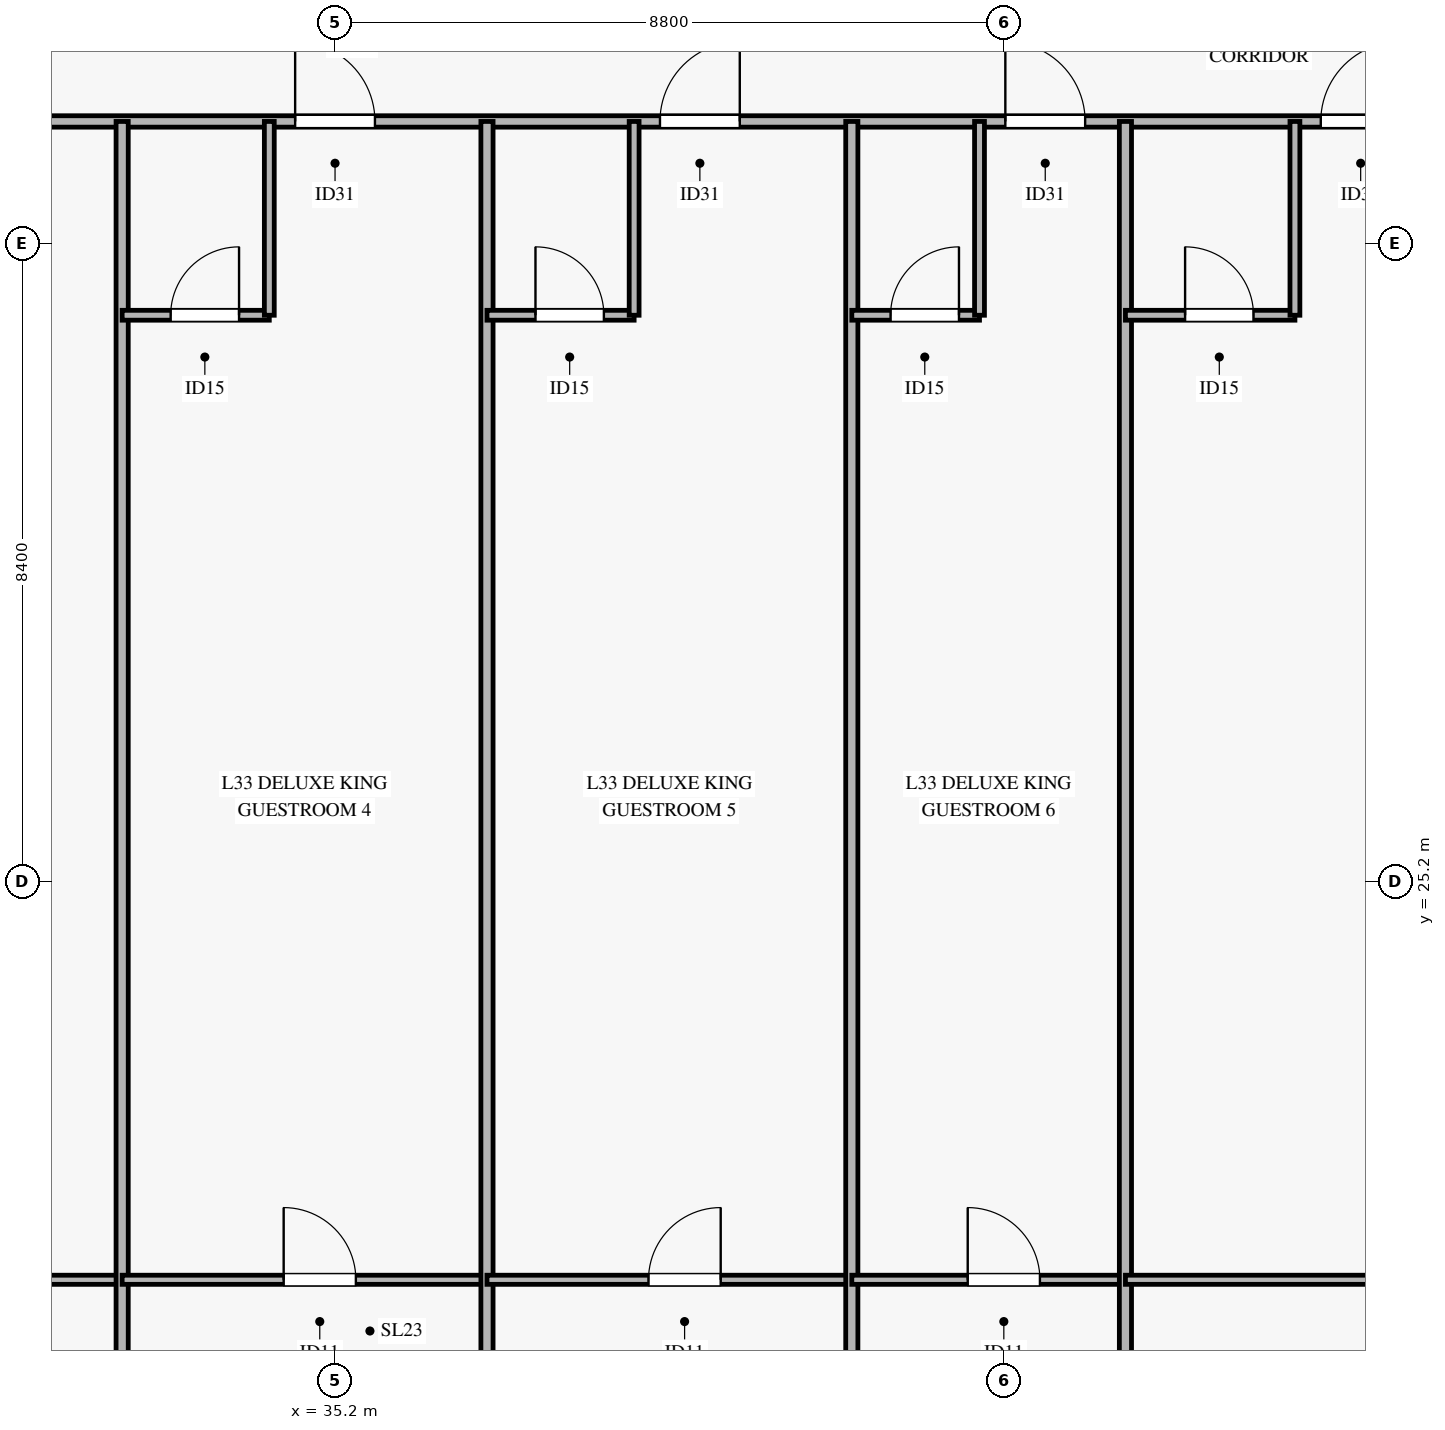
"""IFC4 building model, lengths in metres.
Left out: names, types, materials, properties, quantities, classifications, styles, units other than length and angle.
Written with IfcOpenShell. Run it as: python <this file> out.ifc"""

import sys

from ifc_helpers import new_model, si_unit, direction, frame, frame_2d, origin, place, context, subcontext, project, spatial, rectangle, extrude, source, transform, mapped, element, fill, save


model = new_model("IFC4")
c1 = context("Model", 3, precision=1e-05, world=origin(), true_north=direction((0.0, 1.0)))
c2 = subcontext(c1, "Body", "Model", "MODEL_VIEW")
j1 = project(units=[si_unit("LENGTHUNIT", "METRE"), si_unit("PLANEANGLEUNIT", "RADIAN")], contexts=[c1])
p1 = place(None, origin())
s1 = spatial("IfcSite", under=j1, at=p1, CompositionType="ELEMENT")
p2 = place(p1, origin())
s2 = spatial("IfcBuilding", under=s1, at=p2, CompositionType="ELEMENT")
p3 = place(p2, frame((0.0, 0.0, 137.7)))
s3 = spatial("IfcBuildingStorey", under=s2, at=p3, CompositionType="ELEMENT", Elevation=137.7)
p4 = place(p3, frame((5.214, 35.2, 0.0), z_axis=(0.0, 0.0, 1.0), x_axis=(1.0, 0.0, 0.0)))
e1 = element("IfcWall", 1, at=p4, inside=s3, PredefinedType="PARTITIONING", context=c2, shape_type="SweptSolid", body=[
    extrude(rectangle(XDim=59.972, YDim=0.15, at=frame_2d((29.986, 0.0))), origin(), (0.0, 0.0, 1.0), 2.455),
])
p5 = place(p4, frame((2.77, 0.0, 0.0)))
e2 = element("IfcOpeningElement", 2, at=p5, cuts=e1, PredefinedType="OPENING", context=c2, shape_type="SweptSolid", body=[
    extrude(rectangle(XDim=1.05, YDim=2.15, at=frame_2d((0.525, 1.075))), frame((0.0, 0.085, 0.0), z_axis=(0.0, -1.0, 0.0), x_axis=(1.0, 0.0, 0.0)), (0.0, 0.0, 1.0), 0.17),
])
p6 = place(p4, frame((19.156, 0.0, 0.0)))
e3 = element("IfcOpeningElement", 3, at=p6, cuts=e1, PredefinedType="OPENING", context=c2, shape_type="SweptSolid", body=[
    extrude(rectangle(XDim=1.05, YDim=2.15, at=frame_2d((0.525, 1.075))), frame((0.0, 0.085, 0.0), z_axis=(0.0, -1.0, 0.0), x_axis=(1.0, 0.0, 0.0)), (0.0, 0.0, 1.0), 0.17),
])
p7 = place(p4, frame((24.662, 0.0, 0.0)))
e4 = element("IfcOpeningElement", 4, at=p7, cuts=e1, PredefinedType="OPENING", context=c2, shape_type="SweptSolid", body=[
    extrude(rectangle(XDim=1.05, YDim=2.15, at=frame_2d((0.525, 1.075))), frame((0.0, 0.085, 0.0), z_axis=(0.0, -1.0, 0.0), x_axis=(1.0, 0.0, 0.0)), (0.0, 0.0, 1.0), 0.17),
])
p8 = place(p4, frame((29.462, 0.0, 0.0)))
e5 = element("IfcOpeningElement", 5, at=p8, cuts=e1, PredefinedType="OPENING", context=c2, shape_type="SweptSolid", body=[
    extrude(rectangle(XDim=1.05, YDim=2.15, at=frame_2d((0.525, 1.075))), frame((0.0, 0.085, 0.0), z_axis=(0.0, -1.0, 0.0), x_axis=(1.0, 0.0, 0.0)), (0.0, 0.0, 1.0), 0.17),
])
p9 = place(p4, frame((34.262, 0.0, 0.0)))
e6 = element("IfcOpeningElement", 6, at=p9, cuts=e1, PredefinedType="OPENING", context=c2, shape_type="SweptSolid", body=[
    extrude(rectangle(XDim=1.05, YDim=2.15, at=frame_2d((0.525, 1.075))), frame((0.0, 0.085, 0.0), z_axis=(0.0, -1.0, 0.0), x_axis=(1.0, 0.0, 0.0)), (0.0, 0.0, 1.0), 0.17),
])
p10 = place(p4, frame((38.806, 0.0, 0.0)))
e7 = element("IfcOpeningElement", 7, at=p10, cuts=e1, PredefinedType="OPENING", context=c2, shape_type="SweptSolid", body=[
    extrude(rectangle(XDim=1.05, YDim=2.15, at=frame_2d((0.525, 1.075))), frame((0.0, 0.085, 0.0), z_axis=(0.0, -1.0, 0.0), x_axis=(1.0, 0.0, 0.0)), (0.0, 0.0, 1.0), 0.17),
])
p11 = place(p4, frame((42.956, 0.0, 0.0)))
e8 = element("IfcOpeningElement", 8, at=p11, cuts=e1, PredefinedType="OPENING", context=c2, shape_type="SweptSolid", body=[
    extrude(rectangle(XDim=1.05, YDim=2.15, at=frame_2d((0.525, 1.075))), frame((0.0, 0.085, 0.0), z_axis=(0.0, -1.0, 0.0), x_axis=(1.0, 0.0, 0.0)), (0.0, 0.0, 1.0), 0.17),
])
p12 = place(p3, frame((27.6, 19.959, 0.0), z_axis=(0.0, 0.0, 1.0), x_axis=(1.0, 0.0, 0.0)))
e9 = element("IfcWall", 9, at=p12, inside=s3, PredefinedType="PARTITIONING", context=c2, shape_type="SweptSolid", body=[
    extrude(rectangle(XDim=4.8, YDim=0.12, at=frame_2d((2.4, 0.0))), origin(), (0.0, 0.0, 1.0), 2.455),
])
p13 = place(p12, frame((2.125, 0.0, 0.0)))
e10 = element("IfcOpeningElement", 10, at=p13, cuts=e9, PredefinedType="OPENING", context=c2, shape_type="SweptSolid", body=[
    extrude(rectangle(XDim=0.95, YDim=2.1, at=frame_2d((0.475, 1.05))), frame((0.0, 0.07, 0.0), z_axis=(0.0, -1.0, 0.0), x_axis=(1.0, 0.0, 0.0)), (0.0, 0.0, 1.0), 0.14),
])
p14 = place(p3, frame((32.4, 8.045, 0.0), z_axis=(0.0, 0.0, 1.0), x_axis=(0.0, 1.0, 0.0)))
e11 = element("IfcWall", 11, at=p14, inside=s3, PredefinedType="PARTITIONING", context=c2, shape_type="SweptSolid", body=[
    extrude(rectangle(XDim=27.155, YDim=0.16, at=frame_2d((13.578, 0.0))), origin(), (0.0, 0.0, 1.0), 2.755),
])
p15 = place(p3, frame((32.4, 32.65, 0.0), z_axis=(0.0, 0.0, 1.0), x_axis=(1.0, 0.0, 0.0)))
e12 = element("IfcWall", 12, at=p15, inside=s3, PredefinedType="PARTITIONING", context=c2, shape_type="SweptSolid", body=[
    extrude(rectangle(XDim=1.936, YDim=0.13, at=frame_2d((0.968, 0.0))), origin(), (0.0, 0.0, 1.0), 2.805),
])
p16 = place(p15, frame((0.638, 0.0, 0.0)))
e13 = element("IfcOpeningElement", 13, at=p16, cuts=e12, PredefinedType="OPENING", context=c2, shape_type="SweptSolid", body=[
    extrude(rectangle(XDim=0.9, YDim=2.1, at=frame_2d((0.45, 1.05))), frame((0.0, 0.075, 0.0), z_axis=(0.0, -1.0, 0.0), x_axis=(1.0, 0.0, 0.0)), (0.0, 0.0, 1.0), 0.15),
])
p17 = place(p3, frame((34.336, 32.65, 0.0), z_axis=(0.0, 0.0, 1.0), x_axis=(0.0, 1.0, 0.0)))
e14 = element("IfcWall", 14, at=p17, inside=s3, PredefinedType="PARTITIONING", context=c2, shape_type="SweptSolid", body=[
    extrude(rectangle(XDim=2.55, YDim=0.13, at=frame_2d((1.275, 0.0))), origin(), (0.0, 0.0, 1.0), 3.27),
])
p18 = place(p3, frame((32.4, 19.959, 0.0), z_axis=(0.0, 0.0, 1.0), x_axis=(1.0, 0.0, 0.0)))
e15 = element("IfcWall", 15, at=p18, inside=s3, PredefinedType="PARTITIONING", context=c2, shape_type="SweptSolid", body=[
    extrude(rectangle(XDim=4.8, YDim=0.12, at=frame_2d((2.4, 0.0))), origin(), (0.0, 0.0, 1.0), 3.27),
])
p19 = place(p18, frame((2.125, 0.0, 0.0)))
e16 = element("IfcOpeningElement", 16, at=p19, cuts=e15, PredefinedType="OPENING", context=c2, shape_type="SweptSolid", body=[
    extrude(rectangle(XDim=0.95, YDim=2.1, at=frame_2d((0.475, 1.05))), frame((0.0, 0.07, 0.0), z_axis=(0.0, -1.0, 0.0), x_axis=(1.0, 0.0, 0.0)), (0.0, 0.0, 1.0), 0.14),
])
p20 = place(p3, frame((37.2, 8.045, 0.0), z_axis=(0.0, 0.0, 1.0), x_axis=(0.0, 1.0, 0.0)))
e17 = element("IfcWall", 17, at=p20, inside=s3, PredefinedType="PARTITIONING", context=c2, shape_type="SweptSolid", body=[
    extrude(rectangle(XDim=27.155, YDim=0.16, at=frame_2d((13.578, 0.0))), origin(), (0.0, 0.0, 1.0), 2.805),
])
p21 = place(p3, frame((37.2, 32.65, 0.0), z_axis=(0.0, 0.0, 1.0), x_axis=(1.0, 0.0, 0.0)))
e18 = element("IfcWall", 18, at=p21, inside=s3, PredefinedType="PARTITIONING", context=c2, shape_type="SweptSolid", body=[
    extrude(rectangle(XDim=1.936, YDim=0.13, at=frame_2d((0.968, 0.0))), origin(), (0.0, 0.0, 1.0), 2.455),
])
p22 = place(p21, frame((0.638, 0.0, 0.0)))
e19 = element("IfcOpeningElement", 19, at=p22, cuts=e18, PredefinedType="OPENING", context=c2, shape_type="SweptSolid", body=[
    extrude(rectangle(XDim=0.9, YDim=2.1, at=frame_2d((0.45, 1.05))), frame((0.0, 0.075, 0.0), z_axis=(0.0, -1.0, 0.0), x_axis=(1.0, 0.0, 0.0)), (0.0, 0.0, 1.0), 0.15),
])
p23 = place(p3, frame((39.136, 32.65, 0.0), z_axis=(0.0, 0.0, 1.0), x_axis=(0.0, 1.0, 0.0)))
e20 = element("IfcWall", 20, at=p23, inside=s3, PredefinedType="PARTITIONING", context=c2, shape_type="SweptSolid", body=[
    extrude(rectangle(XDim=2.55, YDim=0.13, at=frame_2d((1.275, 0.0))), origin(), (0.0, 0.0, 1.0), 3.27),
])
p24 = place(p3, frame((37.2, 19.959, 0.0), z_axis=(0.0, 0.0, 1.0), x_axis=(1.0, 0.0, 0.0)))
e21 = element("IfcWall", 21, at=p24, inside=s3, PredefinedType="PARTITIONING", context=c2, shape_type="SweptSolid", body=[
    extrude(rectangle(XDim=4.8, YDim=0.12, at=frame_2d((2.4, 0.0))), origin(), (0.0, 0.0, 1.0), 2.455),
])
p25 = place(p24, frame((2.125, 0.0, 0.0)))
e22 = element("IfcOpeningElement", 22, at=p25, cuts=e21, PredefinedType="OPENING", context=c2, shape_type="SweptSolid", body=[
    extrude(rectangle(XDim=0.95, YDim=2.1, at=frame_2d((0.475, 1.05))), frame((0.0, 0.07, 0.0), z_axis=(0.0, -1.0, 0.0), x_axis=(1.0, 0.0, 0.0)), (0.0, 0.0, 1.0), 0.14),
])
p26 = place(p3, frame((42.0, 8.045, 0.0), z_axis=(0.0, 0.0, 1.0), x_axis=(0.0, 1.0, 0.0)))
e23 = element("IfcWall", 23, at=p26, inside=s3, PredefinedType="PARTITIONING", context=c2, shape_type="SweptSolid", body=[
    extrude(rectangle(XDim=27.155, YDim=0.16, at=frame_2d((13.578, 0.0))), origin(), (0.0, 0.0, 1.0), 2.755),
])
p27 = place(p3, frame((42.0, 32.65, 0.0), z_axis=(0.0, 0.0, 1.0), x_axis=(1.0, 0.0, 0.0)))
e24 = element("IfcWall", 24, at=p27, inside=s3, PredefinedType="PARTITIONING", context=c2, shape_type="SweptSolid", body=[
    extrude(rectangle(XDim=1.68, YDim=0.13, at=frame_2d((0.84, 0.0))), origin(), (0.0, 0.0, 1.0), 2.805),
])
p28 = place(p27, frame((0.51, 0.0, 0.0)))
e25 = element("IfcOpeningElement", 25, at=p28, cuts=e24, PredefinedType="OPENING", context=c2, shape_type="SweptSolid", body=[
    extrude(rectangle(XDim=0.9, YDim=2.1, at=frame_2d((0.45, 1.05))), frame((0.0, 0.075, 0.0), z_axis=(0.0, -1.0, 0.0), x_axis=(1.0, 0.0, 0.0)), (0.0, 0.0, 1.0), 0.15),
])
p29 = place(p3, frame((43.68, 32.65, 0.0), z_axis=(0.0, 0.0, 1.0), x_axis=(0.0, 1.0, 0.0)))
e26 = element("IfcWall", 26, at=p29, inside=s3, PredefinedType="PARTITIONING", context=c2, shape_type="SweptSolid", body=[
    extrude(rectangle(XDim=2.55, YDim=0.13, at=frame_2d((1.275, 0.0))), origin(), (0.0, 0.0, 1.0), 3.27),
])
p30 = place(p3, frame((42.0, 19.959, 0.0), z_axis=(0.0, 0.0, 1.0), x_axis=(1.0, 0.0, 0.0)))
e27 = element("IfcWall", 27, at=p30, inside=s3, PredefinedType="PARTITIONING", context=c2, shape_type="SweptSolid", body=[
    extrude(rectangle(XDim=3.6, YDim=0.12, at=frame_2d((1.8, 0.0))), origin(), (0.0, 0.0, 1.0), 2.455),
])
p31 = place(p30, frame((1.525, 0.0, 0.0)))
e28 = element("IfcOpeningElement", 28, at=p31, cuts=e27, PredefinedType="OPENING", context=c2, shape_type="SweptSolid", body=[
    extrude(rectangle(XDim=0.95, YDim=2.1, at=frame_2d((0.475, 1.05))), frame((0.0, 0.07, 0.0), z_axis=(0.0, -1.0, 0.0), x_axis=(1.0, 0.0, 0.0)), (0.0, 0.0, 1.0), 0.14),
])
p32 = place(p3, frame((45.6, 8.045, 0.0), z_axis=(0.0, 0.0, 1.0), x_axis=(0.0, 1.0, 0.0)))
e29 = element("IfcWall", 29, at=p32, inside=s3, PredefinedType="PARTITIONING", context=c2, shape_type="SweptSolid", body=[
    extrude(rectangle(XDim=27.155, YDim=0.16, at=frame_2d((13.578, 0.0))), origin(), (0.0, 0.0, 1.0), 2.755),
])
p33 = place(p3, frame((45.6, 32.65, 0.0), z_axis=(0.0, 0.0, 1.0), x_axis=(1.0, 0.0, 0.0)))
e30 = element("IfcWall", 30, at=p33, inside=s3, PredefinedType="PARTITIONING", context=c2, shape_type="SweptSolid", body=[
    extrude(rectangle(XDim=2.23, YDim=0.13, at=frame_2d((1.115, 0.0))), origin(), (0.0, 0.0, 1.0), 2.805),
])
p34 = place(p33, frame((0.785, 0.0, 0.0)))
e31 = element("IfcOpeningElement", 31, at=p34, cuts=e30, PredefinedType="OPENING", context=c2, shape_type="SweptSolid", body=[
    extrude(rectangle(XDim=0.9, YDim=2.1, at=frame_2d((0.45, 1.05))), frame((0.0, 0.075, 0.0), z_axis=(0.0, -1.0, 0.0), x_axis=(1.0, 0.0, 0.0)), (0.0, 0.0, 1.0), 0.15),
])
p35 = place(p3, frame((47.83, 32.65, 0.0), z_axis=(0.0, 0.0, 1.0), x_axis=(0.0, 1.0, 0.0)))
e32 = element("IfcWall", 32, at=p35, inside=s3, PredefinedType="PARTITIONING", context=c2, shape_type="SweptSolid", body=[
    extrude(rectangle(XDim=2.55, YDim=0.13, at=frame_2d((1.275, 0.0))), origin(), (0.0, 0.0, 1.0), 3.27),
])
p36 = place(p3, frame((45.6, 19.959, 0.0), z_axis=(0.0, 0.0, 1.0), x_axis=(1.0, 0.0, 0.0)))
e33 = element("IfcWall", 33, at=p36, inside=s3, PredefinedType="PARTITIONING", context=c2, shape_type="SweptSolid", body=[
    extrude(rectangle(XDim=19.586, YDim=0.12, at=frame_2d((9.793, 0.0))), origin(), (0.0, 0.0, 1.0), 2.455),
])
p37 = place(p36, frame((9.418, 0.0, 0.0)))
e34 = element("IfcOpeningElement", 34, at=p37, cuts=e33, PredefinedType="OPENING", context=c2, shape_type="SweptSolid", body=[
    extrude(rectangle(XDim=0.95, YDim=2.1, at=frame_2d((0.475, 1.05))), frame((0.0, 0.07, 0.0), z_axis=(0.0, -1.0, 0.0), x_axis=(1.0, 0.0, 0.0)), (0.0, 0.0, 1.0), 0.14),
])
m1 = source(origin(), c2, "Body", "SweptSolid", [
    extrude(rectangle(XDim=1.05, YDim=2.15, at=frame_2d((0.525, 1.075))), frame((0.0, 0.025, 0.0), z_axis=(0.0, -1.0, 0.0), x_axis=(1.0, 0.0, 0.0)), (0.0, 0.0, 1.0), 0.05),
])
p38 = place(p8, origin())
e35 = element("IfcDoor", 35, at=p38, inside=s3, OperationType="SINGLE_SWING_LEFT", PredefinedType="DOOR", context=c2, shape_type="MappedRepresentation", body=[
    mapped(m1, transform((0.0, 0.0, 0.0), x_axis=(1.0, 0.0, 0.0), y_axis=(0.0, 1.0, 0.0), z_axis=(0.0, 0.0, 1.0), scale=1.0)),
])
fill(e5, e35)
m2 = source(origin(), c2, "Body", "SweptSolid", [
    extrude(rectangle(XDim=0.9, YDim=2.1, at=frame_2d((0.45, 1.05))), frame((0.0, 0.025, 0.0), z_axis=(0.0, -1.0, 0.0), x_axis=(1.0, 0.0, 0.0)), (0.0, 0.0, 1.0), 0.05),
])
p39 = place(p16, origin())
e36 = element("IfcDoor", 36, at=p39, inside=s3, OperationType="SINGLE_SWING_RIGHT", PredefinedType="DOOR", context=c2, shape_type="MappedRepresentation", body=[
    mapped(m2, transform((0.0, 0.0, 0.0), x_axis=(1.0, 0.0, 0.0), y_axis=(0.0, 1.0, 0.0), z_axis=(0.0, 0.0, 1.0), scale=1.0)),
])
fill(e13, e36)
m3 = source(origin(), c2, "Body", "SweptSolid", [
    extrude(rectangle(XDim=0.95, YDim=2.1, at=frame_2d((0.475, 1.05))), frame((0.0, 0.025, 0.0), z_axis=(0.0, -1.0, 0.0), x_axis=(1.0, 0.0, 0.0)), (0.0, 0.0, 1.0), 0.05),
])
p40 = place(p19, origin())
e37 = element("IfcDoor", 37, at=p40, inside=s3, OperationType="SINGLE_SWING_LEFT", PredefinedType="DOOR", context=c2, shape_type="MappedRepresentation", body=[
    mapped(m3, transform((0.0, 0.0, 0.0), x_axis=(1.0, 0.0, 0.0), y_axis=(0.0, 1.0, 0.0), z_axis=(0.0, 0.0, 1.0), scale=1.0)),
])
fill(e16, e37)
p41 = place(p9, origin())
e38 = element("IfcDoor", 38, at=p41, inside=s3, OperationType="SINGLE_SWING_RIGHT", PredefinedType="DOOR", context=c2, shape_type="MappedRepresentation", body=[
    mapped(m1, transform((0.0, 0.0, 0.0), x_axis=(1.0, 0.0, 0.0), y_axis=(0.0, 1.0, 0.0), z_axis=(0.0, 0.0, 1.0), scale=1.0)),
])
fill(e6, e38)
p42 = place(p22, origin())
e39 = element("IfcDoor", 39, at=p42, inside=s3, OperationType="SINGLE_SWING_LEFT", PredefinedType="DOOR", context=c2, shape_type="MappedRepresentation", body=[
    mapped(m2, transform((0.0, 0.0, 0.0), x_axis=(1.0, 0.0, 0.0), y_axis=(0.0, 1.0, 0.0), z_axis=(0.0, 0.0, 1.0), scale=1.0)),
])
fill(e19, e39)
p43 = place(p25, origin())
e40 = element("IfcDoor", 40, at=p43, inside=s3, OperationType="SINGLE_SWING_RIGHT", PredefinedType="DOOR", context=c2, shape_type="MappedRepresentation", body=[
    mapped(m3, transform((0.0, 0.0, 0.0), x_axis=(1.0, 0.0, 0.0), y_axis=(0.0, 1.0, 0.0), z_axis=(0.0, 0.0, 1.0), scale=1.0)),
])
fill(e22, e40)
p44 = place(p10, origin())
e41 = element("IfcDoor", 41, at=p44, inside=s3, OperationType="SINGLE_SWING_LEFT", PredefinedType="DOOR", context=c2, shape_type="MappedRepresentation", body=[
    mapped(m1, transform((0.0, 0.0, 0.0), x_axis=(1.0, 0.0, 0.0), y_axis=(0.0, 1.0, 0.0), z_axis=(0.0, 0.0, 1.0), scale=1.0)),
])
fill(e7, e41)
p45 = place(p28, origin())
e42 = element("IfcDoor", 42, at=p45, inside=s3, OperationType="SINGLE_SWING_RIGHT", PredefinedType="DOOR", context=c2, shape_type="MappedRepresentation", body=[
    mapped(m2, transform((0.0, 0.0, 0.0), x_axis=(1.0, 0.0, 0.0), y_axis=(0.0, 1.0, 0.0), z_axis=(0.0, 0.0, 1.0), scale=1.0)),
])
fill(e25, e42)
p46 = place(p31, origin())
e43 = element("IfcDoor", 43, at=p46, inside=s3, OperationType="SINGLE_SWING_LEFT", PredefinedType="DOOR", context=c2, shape_type="MappedRepresentation", body=[
    mapped(m3, transform((0.0, 0.0, 0.0), x_axis=(1.0, 0.0, 0.0), y_axis=(0.0, 1.0, 0.0), z_axis=(0.0, 0.0, 1.0), scale=1.0)),
])
fill(e28, e43)
p47 = place(p11, origin())
e44 = element("IfcDoor", 44, at=p47, inside=s3, OperationType="SINGLE_SWING_RIGHT", PredefinedType="DOOR", context=c2, shape_type="MappedRepresentation", body=[
    mapped(m1, transform((0.0, 0.0, 0.0), x_axis=(1.0, 0.0, 0.0), y_axis=(0.0, 1.0, 0.0), z_axis=(0.0, 0.0, 1.0), scale=1.0)),
])
fill(e8, e44)
p48 = place(p34, origin())
e45 = element("IfcDoor", 45, at=p48, inside=s3, OperationType="SINGLE_SWING_LEFT", PredefinedType="DOOR", context=c2, shape_type="MappedRepresentation", body=[
    mapped(m2, transform((0.0, 0.0, 0.0), x_axis=(1.0, 0.0, 0.0), y_axis=(0.0, 1.0, 0.0), z_axis=(0.0, 0.0, 1.0), scale=1.0)),
])
fill(e31, e45)
save(model, sys.argv[1])
